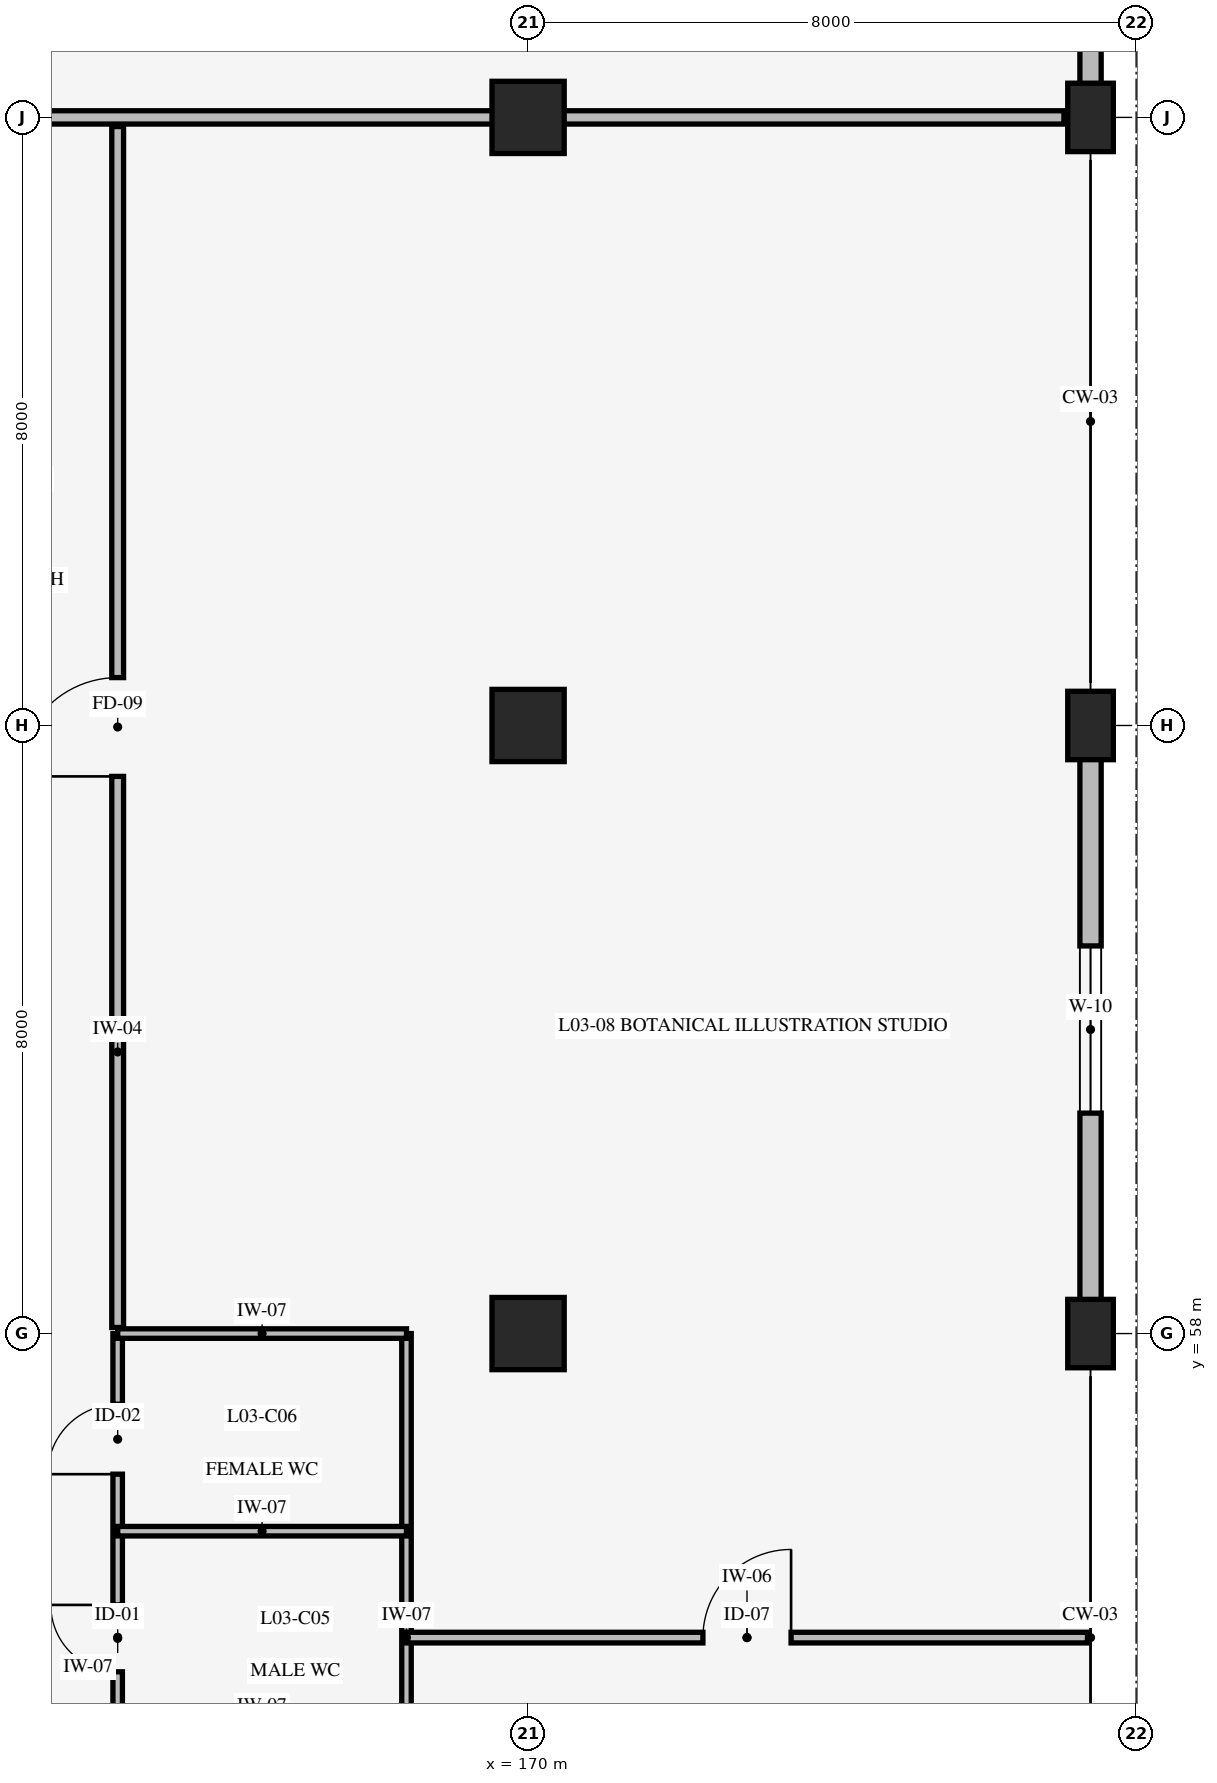
"""IFC4 building model, lengths in metres.
Left out: names, types, materials, properties, quantities, classifications, styles, units other than length and angle.
Written with IfcOpenShell. Run it as: python <this file> out.ifc"""

import sys

from ifc_helpers import new_model, si_unit, direction, frame, frame_2d, origin, origin_2d, place, context, subcontext, project, spatial, rectangle, extrude, element, fill, save


model = new_model("IFC4")
c1 = context("Model", 3, precision=1e-05, world=origin(), true_north=direction((0.0, 1.0)))
c2 = subcontext(c1, "Body", "Model", "MODEL_VIEW")
j1 = project(units=[si_unit("LENGTHUNIT", "METRE"), si_unit("PLANEANGLEUNIT", "RADIAN")], contexts=[c1])
p1 = place(None, origin())
s1 = spatial("IfcSite", under=j1, at=p1, CompositionType="ELEMENT")
p2 = place(p1, origin())
s2 = spatial("IfcBuilding", under=s1, at=p2, CompositionType="ELEMENT")
p3 = place(p2, frame((0.0, 0.0, 10.2)))
s3 = spatial("IfcBuildingStorey", under=s2, at=p3, CompositionType="ELEMENT", Elevation=10.2)
for number, where, z_axis, x_axis in (
    (1, (170.0, 58.0, 0.0), (0.0, 0.0, 1.0), (1.0, 0.0, 0.0)),
    (2, (170.0, 66.0, 0.0), (0.0, 0.0, 1.0), (1.0, 0.0, 0.0)),
    (3, (170.0, 74.0, 0.0), (0.0, 0.0, 1.0), (1.0, 0.0, 0.0)),
):
    element("IfcColumn", number, at=place(p3, frame(where, z_axis=z_axis, x_axis=x_axis)), inside=s3, PredefinedType="COLUMN", context=c2, shape_type="SweptSolid", body=[
        extrude(rectangle(XDim=0.95, YDim=0.95, at=origin_2d()), origin(), (0.0, 0.0, 1.0), 4.8),
    ])
for number, where, z_axis, x_axis in (
    (4, (177.4, 58.0, 0.0), (0.0, 0.0, 1.0), (1.0, 0.0, 0.0)),
    (5, (177.4, 66.0, 0.0), (0.0, 0.0, 1.0), (1.0, 0.0, 0.0)),
    (6, (177.4, 74.0, 0.0), (0.0, 0.0, 1.0), (1.0, 0.0, 0.0)),
):
    element("IfcColumn", number, at=place(p3, frame(where, z_axis=z_axis, x_axis=x_axis)), inside=s3, PredefinedType="COLUMN", context=c2, shape_type="SweptSolid", body=[
        extrude(rectangle(XDim=0.6, YDim=0.9, at=origin_2d()), origin(), (0.0, 0.0, 1.0), 4.8),
    ])
p4 = place(p3, frame((177.4, 82.0, 0.0), z_axis=(0.0, 0.0, 1.0), x_axis=(0.0, -1.0, 0.0)))
e7 = element("IfcWall", 7, at=p4, inside=s3, PredefinedType="STANDARD", context=c2, shape_type="SweptSolid", body=[
    extrude(rectangle(XDim=8.0, YDim=0.28, at=frame_2d((4.0, 0.0))), origin(), (0.0, 0.0, 1.0), 3.68),
])
p5 = place(p4, frame((2.7, 0.0, 0.85)))
e8 = element("IfcOpeningElement", 8, at=p5, cuts=e7, PredefinedType="OPENING", context=c2, shape_type="SweptSolid", body=[
    extrude(rectangle(XDim=2.6, YDim=1.5, at=frame_2d((1.3, 0.75))), frame((0.0, 0.15, 0.0), z_axis=(0.0, -1.0, 0.0), x_axis=(1.0, 0.0, 0.0)), (0.0, 0.0, 1.0), 0.3),
])
p6 = place(p3, frame((177.4, 66.0, 0.0), z_axis=(0.0, 0.0, 1.0), x_axis=(0.0, -1.0, 0.0)))
e9 = element("IfcWall", 9, at=p6, inside=s3, PredefinedType="STANDARD", context=c2, shape_type="SweptSolid", body=[
    extrude(rectangle(XDim=8.0, YDim=0.28, at=frame_2d((4.0, 0.0))), origin(), (0.0, 0.0, 1.0), 3.68),
])
p7 = place(p6, frame((2.9, 0.0, 0.85)))
e10 = element("IfcOpeningElement", 10, at=p7, cuts=e9, PredefinedType="OPENING", context=c2, shape_type="SweptSolid", body=[
    extrude(rectangle(XDim=2.2, YDim=1.4, at=frame_2d((1.1, 0.7))), frame((0.0, 0.15, 0.0), z_axis=(0.0, -1.0, 0.0), x_axis=(1.0, 0.0, 0.0)), (0.0, 0.0, 1.0), 0.3),
])
p8 = place(p3, frame((164.6, 50.0, 0.0), z_axis=(0.0, 0.0, 1.0), x_axis=(0.0, 1.0, 0.0)))
e11 = element("IfcWall", 11, at=p8, inside=s3, PredefinedType="STANDARD", context=c2, shape_type="SweptSolid", body=[
    extrude(rectangle(XDim=8.0, YDim=0.125, at=frame_2d((4.0, 0.0))), origin(), (0.0, 0.0, 1.0), 4.5),
])
p9 = place(p8, frame((0.9, 0.0, 0.0)))
e12 = element("IfcOpeningElement", 12, at=p9, cuts=e11, PredefinedType="OPENING", context=c2, shape_type="SweptSolid", body=[
    extrude(rectangle(XDim=0.96, YDim=2.08, at=frame_2d((0.48, 1.04))), frame((0.0, 0.073, 0.0), z_axis=(0.0, -1.0, 0.0), x_axis=(1.0, 0.0, 0.0)), (0.0, 0.0, 1.0), 0.145),
])
p10 = place(p8, frame((3.55, 0.0, 0.0)))
e13 = element("IfcOpeningElement", 13, at=p10, cuts=e11, PredefinedType="OPENING", context=c2, shape_type="SweptSolid", body=[
    extrude(rectangle(XDim=0.88, YDim=2.05, at=frame_2d((0.44, 1.025))), frame((0.0, 0.073, 0.0), z_axis=(0.0, -1.0, 0.0), x_axis=(1.0, 0.0, 0.0)), (0.0, 0.0, 1.0), 0.145),
])
p11 = place(p8, frame((6.15, 0.0, 0.0)))
e14 = element("IfcOpeningElement", 14, at=p11, cuts=e11, PredefinedType="OPENING", context=c2, shape_type="SweptSolid", body=[
    extrude(rectangle(XDim=0.92, YDim=2.05, at=frame_2d((0.46, 1.025))), frame((0.0, 0.073, 0.0), z_axis=(0.0, -1.0, 0.0), x_axis=(1.0, 0.0, 0.0)), (0.0, 0.0, 1.0), 0.145),
])
p12 = place(p3, frame((168.4, 50.0, 0.0), z_axis=(0.0, 0.0, 1.0), x_axis=(0.0, 1.0, 0.0)))
e15 = element("IfcWall", 15, at=p12, inside=s3, PredefinedType="STANDARD", context=c2, shape_type="SweptSolid", body=[
    extrude(rectangle(XDim=8.0, YDim=0.125, at=frame_2d((4.0, 0.0))), origin(), (0.0, 0.0, 1.0), 4.5),
])
p13 = place(p3, frame((164.6, 55.4, 0.0), z_axis=(0.0, 0.0, 1.0), x_axis=(1.0, 0.0, 0.0)))
e16 = element("IfcWall", 16, at=p13, inside=s3, PredefinedType="STANDARD", context=c2, shape_type="SweptSolid", body=[
    extrude(rectangle(XDim=3.8, YDim=0.125, at=frame_2d((1.9, 0.0))), origin(), (0.0, 0.0, 1.0), 4.5),
])
p14 = place(p3, frame((164.6, 58.0, 0.0), z_axis=(0.0, 0.0, 1.0), x_axis=(1.0, 0.0, 0.0)))
e17 = element("IfcWall", 17, at=p14, inside=s3, PredefinedType="STANDARD", context=c2, shape_type="SweptSolid", body=[
    extrude(rectangle(XDim=3.8, YDim=0.125, at=frame_2d((1.9, 0.0))), origin(), (0.0, 0.0, 1.0), 3.63),
])
p15 = place(p3, frame((168.4, 54.0, 0.0), z_axis=(0.0, 0.0, 1.0), x_axis=(1.0, 0.0, 0.0)))
e18 = element("IfcWall", 18, at=p15, inside=s3, PredefinedType="STANDARD", context=c2, shape_type="SweptSolid", body=[
    extrude(rectangle(XDim=8.96, YDim=0.14, at=frame_2d((4.48, 0.0))), origin(), (0.0, 0.0, 1.0), 4.5),
])
p16 = place(p15, frame((3.9, 0.0, 0.0)))
e19 = element("IfcOpeningElement", 19, at=p16, cuts=e18, PredefinedType="OPENING", context=c2, shape_type="SweptSolid", body=[
    extrude(rectangle(XDim=1.16, YDim=2.12, at=frame_2d((0.58, 1.06))), frame((0.0, 0.08, 0.0), z_axis=(0.0, -1.0, 0.0), x_axis=(1.0, 0.0, 0.0)), (0.0, 0.0, 1.0), 0.16),
])
p17 = place(p3, frame((164.6, 58.08, 0.0), z_axis=(0.0, 0.0, 1.0), x_axis=(0.0, 1.0, 0.0)))
e20 = element("IfcWall", 20, at=p17, inside=s3, PredefinedType="STANDARD", context=c2, shape_type="SweptSolid", body=[
    extrude(rectangle(XDim=15.8, YDim=0.155, at=frame_2d((7.9, 0.0))), origin(), (0.0, 0.0, 1.0), 4.5),
])
p18 = place(p17, frame((7.25, 0.0, 0.0)))
e21 = element("IfcOpeningElement", 21, at=p18, cuts=e20, PredefinedType="OPENING", context=c2, shape_type="SweptSolid", body=[
    extrude(rectangle(XDim=1.3, YDim=2.15, at=frame_2d((0.65, 1.075))), frame((0.0, 0.087, 0.0), z_axis=(0.0, -1.0, 0.0), x_axis=(1.0, 0.0, 0.0)), (0.0, 0.0, 1.0), 0.175),
])
p19 = place(p3, frame((154.35, 74.0, 0.0), z_axis=(0.0, 0.0, 1.0), x_axis=(1.0, 0.0, 0.0)))
e22 = element("IfcWall", 22, at=p19, inside=s3, PredefinedType="STANDARD", context=c2, shape_type="SweptSolid", body=[
    extrude(rectangle(XDim=22.7, YDim=0.175, at=frame_2d((11.35, 0.0))), origin(), (0.0, 0.0, 1.0), 3.63),
])
p20 = place(p19, frame((3.3, 0.0, 0.0)))
e23 = element("IfcOpeningElement", 23, at=p20, cuts=e22, PredefinedType="OPENING", context=c2, shape_type="SweptSolid", body=[
    extrude(rectangle(XDim=1.55, YDim=2.25, at=frame_2d((0.775, 1.125))), frame((0.0, 0.098, 0.0), z_axis=(0.0, -1.0, 0.0), x_axis=(1.0, 0.0, 0.0)), (0.0, 0.0, 1.0), 0.195),
])
p21 = place(p7, origin())
e24 = element("IfcWindow", 24, at=p21, inside=s3, PartitioningType="SINGLE_PANEL", PredefinedType="WINDOW", context=c2, shape_type="SweptSolid", body=[
    extrude(rectangle(XDim=2.2, YDim=1.4, at=frame_2d((1.1, 0.7))), frame((0.0, 0.03, 0.0), z_axis=(0.0, -1.0, 0.0), x_axis=(1.0, 0.0, 0.0)), (0.0, 0.0, 1.0), 0.06),
])
fill(e10, e24)
p22 = place(p10, origin())
e25 = element("IfcDoor", 25, at=p22, inside=s3, OperationType="SINGLE_SWING_RIGHT", PredefinedType="DOOR", context=c2, shape_type="SweptSolid", body=[
    extrude(rectangle(XDim=0.88, YDim=2.05, at=frame_2d((0.44, 1.025))), frame((0.0, 0.025, 0.0), z_axis=(0.0, -1.0, 0.0), x_axis=(1.0, 0.0, 0.0)), (0.0, 0.0, 1.0), 0.05),
])
fill(e13, e25)
p23 = place(p11, origin())
e26 = element("IfcDoor", 26, at=p23, inside=s3, OperationType="SINGLE_SWING_LEFT", PredefinedType="DOOR", context=c2, shape_type="SweptSolid", body=[
    extrude(rectangle(XDim=0.92, YDim=2.05, at=frame_2d((0.46, 1.025))), frame((0.0, 0.025, 0.0), z_axis=(0.0, -1.0, 0.0), x_axis=(1.0, 0.0, 0.0)), (0.0, 0.0, 1.0), 0.05),
])
fill(e14, e26)
p24 = place(p16, origin())
e27 = element("IfcDoor", 27, at=p24, inside=s3, OperationType="SINGLE_SWING_RIGHT", PredefinedType="DOOR", context=c2, shape_type="SweptSolid", body=[
    extrude(rectangle(XDim=1.16, YDim=2.12, at=frame_2d((0.58, 1.06))), frame((0.0, 0.025, 0.0), z_axis=(0.0, -1.0, 0.0), x_axis=(1.0, 0.0, 0.0)), (0.0, 0.0, 1.0), 0.05),
])
fill(e19, e27)
p25 = place(p18, origin())
e28 = element("IfcDoor", 28, at=p25, inside=s3, OperationType="SINGLE_SWING_LEFT", PredefinedType="DOOR", context=c2, shape_type="SweptSolid", body=[
    extrude(rectangle(XDim=1.3, YDim=2.15, at=frame_2d((0.65, 1.075))), frame((0.0, 0.025, 0.0), z_axis=(0.0, -1.0, 0.0), x_axis=(1.0, 0.0, 0.0)), (0.0, 0.0, 1.0), 0.05),
])
fill(e21, e28)
save(model, sys.argv[1])
